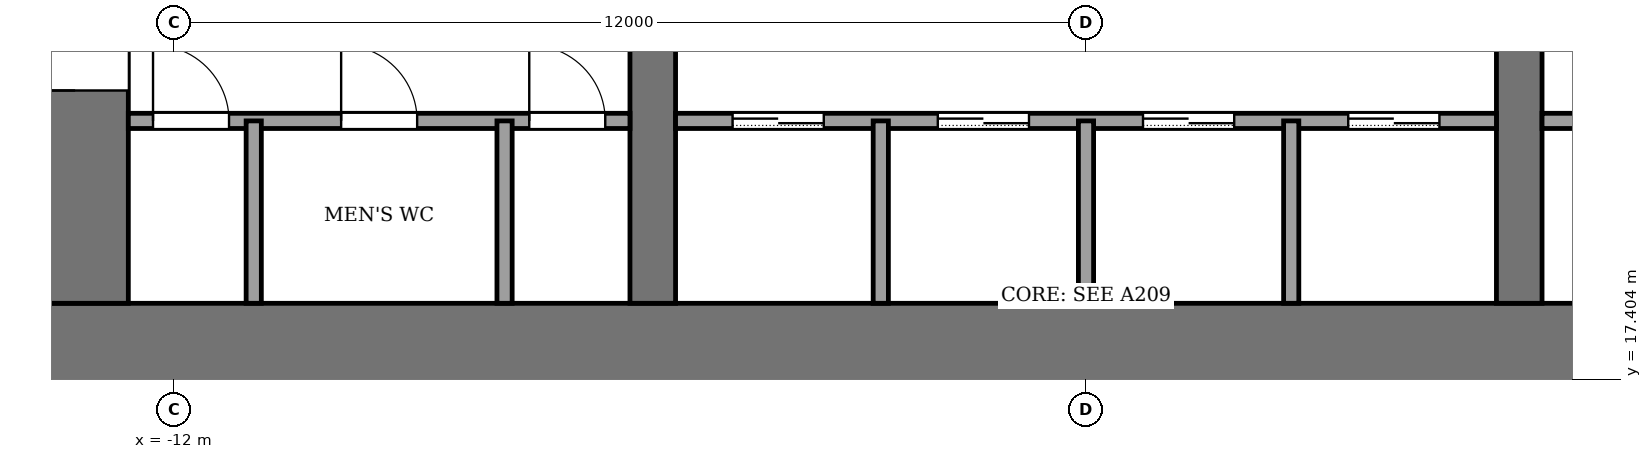
"""IFC4 building model, lengths in metres.
Left out: names, types, materials, properties, quantities, classifications, styles, units other than length and angle.
Written with IfcOpenShell. Run it as: python <this file> out.ifc"""

import sys

from ifc_helpers import new_model, si_unit, direction, frame, frame_2d, origin, place, context, subcontext, project, spatial, rectangle, extrude, element, fill, save


model = new_model("IFC4")
c1 = context("Model", 3, precision=1e-05, world=origin(), true_north=direction((0.0, 1.0)))
c2 = subcontext(c1, "Body", "Model", "MODEL_VIEW")
j1 = project(units=[si_unit("LENGTHUNIT", "METRE"), si_unit("PLANEANGLEUNIT", "RADIAN")], contexts=[c1])
p1 = place(None, origin())
s1 = spatial("IfcSite", under=j1, at=p1, CompositionType="ELEMENT")
p2 = place(p1, origin())
s2 = spatial("IfcBuilding", under=s1, at=p2, CompositionType="ELEMENT")
p3 = place(p2, frame((0.0, 0.0, 50.0)))
s3 = spatial("IfcBuildingStorey", under=s2, at=p3, CompositionType="ELEMENT", Elevation=50.0)
p4 = place(p3, frame((-14.0, 17.7, -0.13), z_axis=(0.0, 0.0, 1.0), x_axis=(1.0, 0.0, 0.0)))
e1 = element("IfcWall", 1, at=p4, inside=s3, PredefinedType="SHEAR", context=c2, shape_type="SweptSolid", body=[
    extrude(rectangle(XDim=28.0, YDim=1.4, at=frame_2d((14.0, 0.0))), origin(), (0.0, 0.0, 1.0), 4.0),
])
p5 = place(p3, frame((-13.3, 18.4, -0.13), z_axis=(0.0, 0.0, 1.0), x_axis=(0.0, 1.0, 0.0)))
e2 = element("IfcWall", 2, at=p5, inside=s3, PredefinedType="SHEAR", context=c2, shape_type="SweptSolid", body=[
    extrude(rectangle(XDim=19.2, YDim=1.4, at=frame_2d((9.6, 0.0))), origin(), (0.0, 0.0, 1.0), 4.0),
])
p6 = place(p5, frame((2.8, 0.0, 0.13)))
e3 = element("IfcOpeningElement", 3, at=p6, cuts=e2, PredefinedType="OPENING", context=c2, shape_type="SweptSolid", body=[
    extrude(rectangle(XDim=2.4, YDim=2.4, at=frame_2d((1.2, 1.2))), frame((0.0, 0.71, 0.0), z_axis=(0.0, -1.0, 0.0), x_axis=(1.0, 0.0, 0.0)), (0.0, 0.0, 1.0), 1.42),
])
p7 = place(p5, frame((13.4, 0.0, 0.13)))
e4 = element("IfcOpeningElement", 4, at=p7, cuts=e2, PredefinedType="OPENING", context=c2, shape_type="SweptSolid", body=[
    extrude(rectangle(XDim=1.4, YDim=2.2, at=frame_2d((0.7, 1.1))), frame((0.0, 0.71, 0.0), z_axis=(0.0, -1.0, 0.0), x_axis=(1.0, 0.0, 0.0)), (0.0, 0.0, 1.0), 1.42),
])
p8 = place(p3, frame((-5.7, 18.4, -0.13), z_axis=(0.0, 0.0, 1.0), x_axis=(0.0, 1.0, 0.0)))
e5 = element("IfcWall", 5, at=p8, inside=s3, PredefinedType="SHEAR", context=c2, shape_type="SweptSolid", body=[
    extrude(rectangle(XDim=19.2, YDim=0.6, at=frame_2d((9.6, 0.0))), origin(), (0.0, 0.0, 1.0), 4.0),
])
p9 = place(p8, frame((8.35, 0.0, 0.13)))
e6 = element("IfcOpeningElement", 6, at=p9, cuts=e5, PredefinedType="OPENING", context=c2, shape_type="SweptSolid", body=[
    extrude(rectangle(XDim=0.9, YDim=2.1, at=frame_2d((0.45, 1.05))), frame((0.0, 0.31, 0.0), z_axis=(0.0, -1.0, 0.0), x_axis=(1.0, 0.0, 0.0)), (0.0, 0.0, 1.0), 0.62),
])
p10 = place(p3, frame((5.7, 18.4, -0.13), z_axis=(0.0, 0.0, 1.0), x_axis=(0.0, 1.0, 0.0)))
e7 = element("IfcWall", 7, at=p10, inside=s3, PredefinedType="SHEAR", context=c2, shape_type="SweptSolid", body=[
    extrude(rectangle(XDim=19.2, YDim=0.6, at=frame_2d((9.6, 0.0))), origin(), (0.0, 0.0, 1.0), 4.0),
])
p11 = place(p10, frame((8.35, 0.0, 0.13)))
e8 = element("IfcOpeningElement", 8, at=p11, cuts=e7, PredefinedType="OPENING", context=c2, shape_type="SweptSolid", body=[
    extrude(rectangle(XDim=0.9, YDim=2.1, at=frame_2d((0.45, 1.05))), frame((0.0, 0.31, 0.0), z_axis=(0.0, -1.0, 0.0), x_axis=(1.0, 0.0, 0.0)), (0.0, 0.0, 1.0), 0.62),
])
p12 = place(p10, frame((13.3, 0.0, 0.13)))
e9 = element("IfcOpeningElement", 9, at=p12, cuts=e7, PredefinedType="OPENING", context=c2, shape_type="SweptSolid", body=[
    extrude(rectangle(XDim=2.4, YDim=2.4, at=frame_2d((1.2, 1.2))), frame((0.0, 0.31, 0.0), z_axis=(0.0, -1.0, 0.0), x_axis=(1.0, 0.0, 0.0)), (0.0, 0.0, 1.0), 0.62),
])
p13 = place(p3, frame((-12.6, 20.8, 0.0), z_axis=(0.0, 0.0, 1.0), x_axis=(1.0, 0.0, 0.0)))
e10 = element("IfcWall", 10, at=p13, inside=s3, PredefinedType="PARTITIONING", context=c2, shape_type="SweptSolid", body=[
    extrude(rectangle(XDim=6.6, YDim=0.2, at=frame_2d((3.3, 0.0))), origin(), (0.0, 0.0, 1.0), 3.87),
])
p14 = place(p13, frame((0.325, 0.0, 0.0)))
e11 = element("IfcOpeningElement", 11, at=p14, cuts=e10, PredefinedType="OPENING", context=c2, shape_type="SweptSolid", body=[
    extrude(rectangle(XDim=1.0, YDim=2.1, at=frame_2d((0.5, 1.05))), frame((0.0, 0.11, 0.0), z_axis=(0.0, -1.0, 0.0), x_axis=(1.0, 0.0, 0.0)), (0.0, 0.0, 1.0), 0.22),
])
p15 = place(p13, frame((2.8, 0.0, 0.0)))
e12 = element("IfcOpeningElement", 12, at=p15, cuts=e10, PredefinedType="OPENING", context=c2, shape_type="SweptSolid", body=[
    extrude(rectangle(XDim=1.0, YDim=2.1, at=frame_2d((0.5, 1.05))), frame((0.0, 0.11, 0.0), z_axis=(0.0, -1.0, 0.0), x_axis=(1.0, 0.0, 0.0)), (0.0, 0.0, 1.0), 0.22),
])
p16 = place(p13, frame((5.275, 0.0, 0.0)))
e13 = element("IfcOpeningElement", 13, at=p16, cuts=e10, PredefinedType="OPENING", context=c2, shape_type="SweptSolid", body=[
    extrude(rectangle(XDim=1.0, YDim=2.1, at=frame_2d((0.5, 1.05))), frame((0.0, 0.11, 0.0), z_axis=(0.0, -1.0, 0.0), x_axis=(1.0, 0.0, 0.0)), (0.0, 0.0, 1.0), 0.22),
])
p17 = place(p3, frame((-5.4, 20.8, 0.0), z_axis=(0.0, 0.0, 1.0), x_axis=(1.0, 0.0, 0.0)))
e14 = element("IfcWall", 14, at=p17, inside=s3, PredefinedType="PARTITIONING", context=c2, shape_type="SweptSolid", body=[
    extrude(rectangle(XDim=10.8, YDim=0.2, at=frame_2d((5.4, 0.0))), origin(), (0.0, 0.0, 1.0), 3.87),
])
p18 = place(p17, frame((0.75, 0.0, 0.0)))
e15 = element("IfcOpeningElement", 15, at=p18, cuts=e14, PredefinedType="OPENING", context=c2, shape_type="SweptSolid", body=[
    extrude(rectangle(XDim=1.2, YDim=2.2, at=frame_2d((0.6, 1.1))), frame((0.0, 0.11, 0.0), z_axis=(0.0, -1.0, 0.0), x_axis=(1.0, 0.0, 0.0)), (0.0, 0.0, 1.0), 0.22),
])
p19 = place(p17, frame((3.45, 0.0, 0.0)))
e16 = element("IfcOpeningElement", 16, at=p19, cuts=e14, PredefinedType="OPENING", context=c2, shape_type="SweptSolid", body=[
    extrude(rectangle(XDim=1.2, YDim=2.2, at=frame_2d((0.6, 1.1))), frame((0.0, 0.11, 0.0), z_axis=(0.0, -1.0, 0.0), x_axis=(1.0, 0.0, 0.0)), (0.0, 0.0, 1.0), 0.22),
])
p20 = place(p17, frame((6.15, 0.0, 0.0)))
e17 = element("IfcOpeningElement", 17, at=p20, cuts=e14, PredefinedType="OPENING", context=c2, shape_type="SweptSolid", body=[
    extrude(rectangle(XDim=1.2, YDim=2.2, at=frame_2d((0.6, 1.1))), frame((0.0, 0.11, 0.0), z_axis=(0.0, -1.0, 0.0), x_axis=(1.0, 0.0, 0.0)), (0.0, 0.0, 1.0), 0.22),
])
p21 = place(p17, frame((8.85, 0.0, 0.0)))
e18 = element("IfcOpeningElement", 18, at=p21, cuts=e14, PredefinedType="OPENING", context=c2, shape_type="SweptSolid", body=[
    extrude(rectangle(XDim=1.2, YDim=2.2, at=frame_2d((0.6, 1.1))), frame((0.0, 0.11, 0.0), z_axis=(0.0, -1.0, 0.0), x_axis=(1.0, 0.0, 0.0)), (0.0, 0.0, 1.0), 0.22),
])
p22 = place(p3, frame((6.0, 20.8, 0.0), z_axis=(0.0, 0.0, 1.0), x_axis=(1.0, 0.0, 0.0)))
e19 = element("IfcWall", 19, at=p22, inside=s3, PredefinedType="PARTITIONING", context=c2, shape_type="SweptSolid", body=[
    extrude(rectangle(XDim=6.6, YDim=0.2, at=frame_2d((3.3, 0.0))), origin(), (0.0, 0.0, 1.0), 3.87),
])
p23 = place(p22, frame((2.8, 0.0, 0.0)))
e20 = element("IfcOpeningElement", 20, at=p23, cuts=e19, PredefinedType="OPENING", context=c2, shape_type="SweptSolid", body=[
    extrude(rectangle(XDim=1.0, YDim=2.1, at=frame_2d((0.5, 1.05))), frame((0.0, 0.11, 0.0), z_axis=(0.0, -1.0, 0.0), x_axis=(1.0, 0.0, 0.0)), (0.0, 0.0, 1.0), 0.22),
])
for number, where, z_axis, x_axis in (
    (21, (-10.95, 18.4, 0.0), (0.0, 0.0, 1.0), (0.0, 1.0, 0.0)),
    (22, (-7.65, 18.4, 0.0), (0.0, 0.0, 1.0), (0.0, 1.0, 0.0)),
    (23, (-2.7, 18.4, 0.0), (0.0, 0.0, 1.0), (0.0, 1.0, 0.0)),
    (24, (0.0, 18.4, 0.0), (0.0, 0.0, 1.0), (0.0, 1.0, 0.0)),
    (25, (2.7, 18.4, 0.0), (0.0, 0.0, 1.0), (0.0, 1.0, 0.0)),
):
    element("IfcWall", number, at=place(p3, frame(where, z_axis=z_axis, x_axis=x_axis)), inside=s3, PredefinedType="PARTITIONING", context=c2, shape_type="SweptSolid", body=[
        extrude(rectangle(XDim=2.4, YDim=0.2, at=frame_2d((1.2, 0.0))), origin(), (0.0, 0.0, 1.0), 3.87),
    ])
p24 = place(p18, origin())
e26 = element("IfcDoor", 26, at=p24, inside=s3, OperationType="SLIDING_TO_LEFT", PredefinedType="DOOR", context=c2, shape_type="SweptSolid", body=[
    extrude(rectangle(XDim=1.2, YDim=2.2, at=frame_2d((0.6, 1.1))), frame((0.0, 0.025, 0.0), z_axis=(0.0, -1.0, 0.0), x_axis=(1.0, 0.0, 0.0)), (0.0, 0.0, 1.0), 0.05),
])
fill(e15, e26)
p25 = place(p19, origin())
e27 = element("IfcDoor", 27, at=p25, inside=s3, OperationType="SLIDING_TO_LEFT", PredefinedType="DOOR", context=c2, shape_type="SweptSolid", body=[
    extrude(rectangle(XDim=1.2, YDim=2.2, at=frame_2d((0.6, 1.1))), frame((0.0, 0.025, 0.0), z_axis=(0.0, -1.0, 0.0), x_axis=(1.0, 0.0, 0.0)), (0.0, 0.0, 1.0), 0.05),
])
fill(e16, e27)
p26 = place(p20, origin())
e28 = element("IfcDoor", 28, at=p26, inside=s3, OperationType="SLIDING_TO_LEFT", PredefinedType="DOOR", context=c2, shape_type="SweptSolid", body=[
    extrude(rectangle(XDim=1.2, YDim=2.2, at=frame_2d((0.6, 1.1))), frame((0.0, 0.025, 0.0), z_axis=(0.0, -1.0, 0.0), x_axis=(1.0, 0.0, 0.0)), (0.0, 0.0, 1.0), 0.05),
])
fill(e17, e28)
p27 = place(p21, origin())
e29 = element("IfcDoor", 29, at=p27, inside=s3, OperationType="SLIDING_TO_LEFT", PredefinedType="DOOR", context=c2, shape_type="SweptSolid", body=[
    extrude(rectangle(XDim=1.2, YDim=2.2, at=frame_2d((0.6, 1.1))), frame((0.0, 0.025, 0.0), z_axis=(0.0, -1.0, 0.0), x_axis=(1.0, 0.0, 0.0)), (0.0, 0.0, 1.0), 0.05),
])
fill(e18, e29)
p28 = place(p14, origin())
e30 = element("IfcDoor", 30, at=p28, inside=s3, OperationType="SINGLE_SWING_RIGHT", PredefinedType="DOOR", context=c2, shape_type="SweptSolid", body=[
    extrude(rectangle(XDim=1.0, YDim=2.1, at=frame_2d((0.5, 1.05))), frame((0.0, 0.025, 0.0), z_axis=(0.0, -1.0, 0.0), x_axis=(1.0, 0.0, 0.0)), (0.0, 0.0, 1.0), 0.05),
])
fill(e11, e30)
p29 = place(p15, origin())
e31 = element("IfcDoor", 31, at=p29, inside=s3, OperationType="SINGLE_SWING_RIGHT", PredefinedType="DOOR", context=c2, shape_type="SweptSolid", body=[
    extrude(rectangle(XDim=1.0, YDim=2.1, at=frame_2d((0.5, 1.05))), frame((0.0, 0.025, 0.0), z_axis=(0.0, -1.0, 0.0), x_axis=(1.0, 0.0, 0.0)), (0.0, 0.0, 1.0), 0.05),
])
fill(e12, e31)
p30 = place(p16, origin())
e32 = element("IfcDoor", 32, at=p30, inside=s3, OperationType="SINGLE_SWING_RIGHT", PredefinedType="DOOR", context=c2, shape_type="SweptSolid", body=[
    extrude(rectangle(XDim=1.0, YDim=2.1, at=frame_2d((0.5, 1.05))), frame((0.0, 0.025, 0.0), z_axis=(0.0, -1.0, 0.0), x_axis=(1.0, 0.0, 0.0)), (0.0, 0.0, 1.0), 0.05),
])
fill(e13, e32)
p31 = place(p6, origin())
e33 = element("IfcDoor", 33, at=p31, inside=s3, OperationType="DOUBLE_DOOR_SINGLE_SWING", PredefinedType="DOOR", context=c2, shape_type="SweptSolid", body=[
    extrude(rectangle(XDim=2.4, YDim=2.4, at=frame_2d((1.2, 1.2))), frame((0.0, 0.025, 0.0), z_axis=(0.0, -1.0, 0.0), x_axis=(1.0, 0.0, 0.0)), (0.0, 0.0, 1.0), 0.05),
])
fill(e3, e33)
save(model, sys.argv[1])
